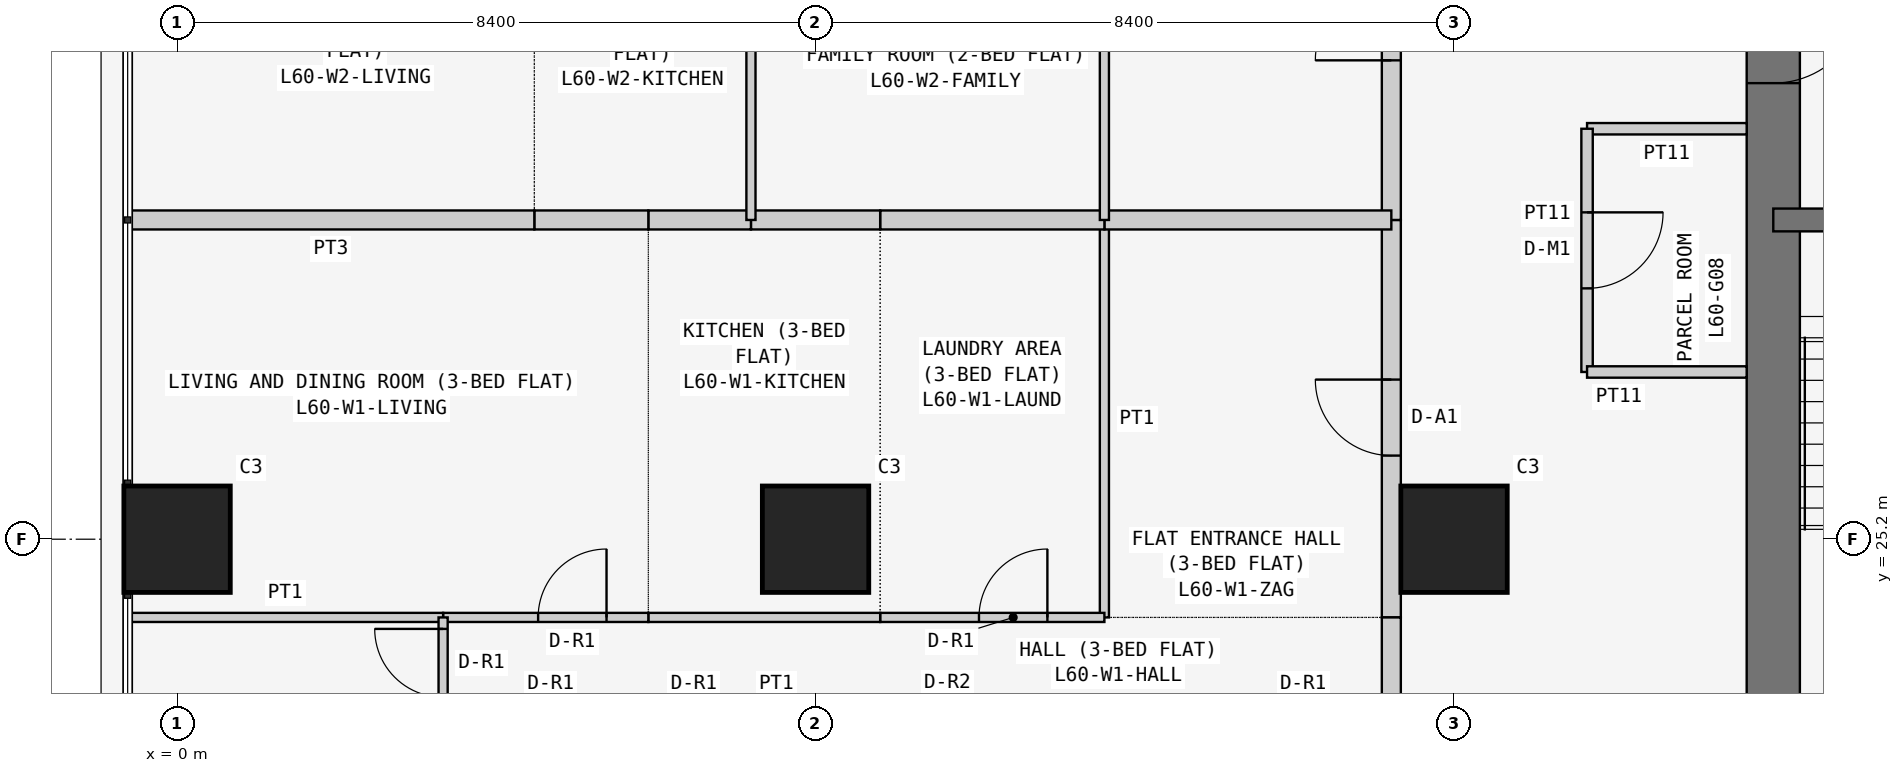
"""IFC4 building model, lengths in metres.
Left out: names, types, materials, properties, quantities, classifications, styles, units other than length and angle.
Written with IfcOpenShell. Run it as: python <this file> out.ifc"""

import sys

from ifc_helpers import new_model, si_unit, direction, frame, frame_2d, origin, origin_2d, place, context, subcontext, project, spatial, rectangle, extrude, element, fill, save


model = new_model("IFC4")
c1 = context("Model", 3, precision=1e-05, world=origin(), true_north=direction((0.0, 1.0)))
c2 = subcontext(c1, "Body", "Model", "MODEL_VIEW")
j1 = project(units=[si_unit("LENGTHUNIT", "METRE"), si_unit("PLANEANGLEUNIT", "RADIAN")], contexts=[c1])
p1 = place(None, origin())
s1 = spatial("IfcSite", under=j1, at=p1, CompositionType="ELEMENT")
p2 = place(p1, origin())
s2 = spatial("IfcBuilding", under=s1, at=p2, CompositionType="ELEMENT")
p3 = place(p2, frame((0.0, 0.0, 230.1)))
s3 = spatial("IfcBuildingStorey", under=s2, at=p3, CompositionType="ELEMENT", Elevation=230.1)
for number, where, z_axis, x_axis in (
    (1, (0.0, 25.2, 0.0), (0.0, 0.0, 1.0), (1.0, 0.0, 0.0)),
    (2, (8.4, 25.2, 0.0), (0.0, 0.0, 1.0), (1.0, 0.0, 0.0)),
    (3, (16.8, 25.2, 0.0), (0.0, 0.0, 1.0), (1.0, 0.0, 0.0)),
):
    element("IfcColumn", number, at=place(p3, frame(where, z_axis=z_axis, x_axis=x_axis)), inside=s3, PredefinedType="COLUMN", context=c2, shape_type="SweptSolid", body=[
        extrude(rectangle(XDim=1.4, YDim=1.4, at=origin_2d()), origin(), (0.0, 0.0, 1.0), 3.6),
    ])
p4 = place(p3, frame((21.0, 37.8, 0.0), z_axis=(0.0, 0.0, 1.0), x_axis=(0.0, -1.0, 0.0)))
e4 = element("IfcWall", 4, at=p4, inside=s3, PredefinedType="SHEAR", context=c2, shape_type="SweptSolid", body=[
    extrude(rectangle(XDim=17.15, YDim=0.7, at=frame_2d((8.575, 0.0))), origin(), (0.0, 0.0, 1.0), 3.6),
])
p5 = place(p4, frame((5.4, 0.0, 0.0)))
e5 = element("IfcOpeningElement", 5, at=p5, cuts=e4, PredefinedType="OPENING", context=c2, shape_type="SweptSolid", body=[
    extrude(rectangle(XDim=1.2, YDim=2.1, at=frame_2d((0.6, 1.05))), frame((0.0, 0.36, 0.0), z_axis=(0.0, -1.0, 0.0), x_axis=(1.0, 0.0, 0.0)), (0.0, 0.0, 1.0), 0.72),
])
p6 = place(p3, frame((21.0, 29.4, 0.0), z_axis=(0.0, 0.0, 1.0), x_axis=(1.0, 0.0, 0.0)))
e6 = element("IfcWall", 6, at=p6, inside=s3, PredefinedType="SHEAR", context=c2, shape_type="SweptSolid", body=[
    extrude(rectangle(XDim=5.6, YDim=0.3, at=frame_2d((2.8, 0.0))), origin(), (0.0, 0.0, 1.0), 3.6),
])
p7 = place(p6, frame((2.3, 0.0, 0.0)))
e7 = element("IfcOpeningElement", 7, at=p7, cuts=e6, PredefinedType="OPENING", context=c2, shape_type="SweptSolid", body=[
    extrude(rectangle(XDim=1.2, YDim=2.1, at=frame_2d((0.6, 1.05))), frame((0.0, 0.16, 0.0), z_axis=(0.0, -1.0, 0.0), x_axis=(1.0, 0.0, 0.0)), (0.0, 0.0, 1.0), 0.32),
])
p8 = place(p3, frame((20.65, 30.6, 0.0), z_axis=(0.0, 0.0, 1.0), x_axis=(-1.0, 0.0, 0.0)))
e8 = element("IfcWall", 8, at=p8, inside=s3, PredefinedType="PARTITIONING", context=c2, shape_type="SweptSolid", body=[
    extrude(rectangle(XDim=2.1, YDim=0.15, at=frame_2d((1.05, 0.0))), origin(), (0.0, 0.0, 1.0), 3.45),
])
p9 = place(p3, frame((18.55, 30.6, 0.0), z_axis=(0.0, 0.0, 1.0), x_axis=(0.0, -1.0, 0.0)))
e9 = element("IfcWall", 9, at=p9, inside=s3, PredefinedType="PARTITIONING", context=c2, shape_type="SweptSolid", body=[
    extrude(rectangle(XDim=3.2, YDim=0.15, at=frame_2d((1.6, 0.0))), origin(), (0.0, 0.0, 1.0), 3.45),
])
p10 = place(p9, frame((1.1, 0.0, 0.0)))
e10 = element("IfcOpeningElement", 10, at=p10, cuts=e9, PredefinedType="OPENING", context=c2, shape_type="SweptSolid", body=[
    extrude(rectangle(XDim=1.0, YDim=2.1, at=frame_2d((0.5, 1.05))), frame((0.0, 0.085, 0.0), z_axis=(0.0, -1.0, 0.0), x_axis=(1.0, 0.0, 0.0)), (0.0, 0.0, 1.0), 0.17),
])
p11 = place(p3, frame((18.55, 27.4, 0.0), z_axis=(0.0, 0.0, 1.0), x_axis=(1.0, 0.0, 0.0)))
e11 = element("IfcWall", 11, at=p11, inside=s3, PredefinedType="PARTITIONING", context=c2, shape_type="SweptSolid", body=[
    extrude(rectangle(XDim=2.1, YDim=0.15, at=frame_2d((1.05, 0.0))), origin(), (0.0, 0.0, 1.0), 3.45),
])
p12 = place(p3, frame((15.975, 24.171, 0.0), z_axis=(0.0, 0.0, 1.0), x_axis=(0.0, 1.0, 0.0)))
e12 = element("IfcWall", 12, at=p12, inside=s3, PredefinedType="PARTITIONING", context=c2, shape_type="SweptSolid", body=[
    extrude(rectangle(XDim=5.229, YDim=0.25, at=frame_2d((2.615, 0.0))), origin(), (0.0, 0.0, 1.0), 3.45),
])
p13 = place(p12, frame((2.129, 0.0, 0.0)))
e13 = element("IfcOpeningElement", 13, at=p13, cuts=e12, PredefinedType="OPENING", context=c2, shape_type="SweptSolid", body=[
    extrude(rectangle(XDim=1.0, YDim=2.1, at=frame_2d((0.5, 1.05))), frame((0.0, 0.135, 0.0), z_axis=(0.0, -1.0, 0.0), x_axis=(1.0, 0.0, 0.0)), (0.0, 0.0, 1.0), 0.27),
])
p14 = place(p3, frame((15.975, 22.971, 0.0), z_axis=(0.0, 0.0, 1.0), x_axis=(0.0, 1.0, 0.0)))
e14 = element("IfcWall", 14, at=p14, inside=s3, PredefinedType="PARTITIONING", context=c2, shape_type="SweptSolid", body=[
    extrude(rectangle(XDim=1.2, YDim=0.25, at=frame_2d((0.6, 0.0))), origin(), (0.0, 0.0, 1.0), 3.45),
])
p15 = place(p3, frame((15.975, 29.4, 0.0), z_axis=(0.0, 0.0, 1.0), x_axis=(0.0, 1.0, 0.0)))
e15 = element("IfcWall", 15, at=p15, inside=s3, PredefinedType="PARTITIONING", context=c2, shape_type="SweptSolid", body=[
    extrude(rectangle(XDim=5.229, YDim=0.25, at=frame_2d((2.615, 0.0))), origin(), (0.0, 0.0, 1.0), 3.45),
])
p16 = place(p15, frame((2.1, 0.0, 0.0)))
e16 = element("IfcOpeningElement", 16, at=p16, cuts=e15, PredefinedType="OPENING", context=c2, shape_type="SweptSolid", body=[
    extrude(rectangle(XDim=1.0, YDim=2.1, at=frame_2d((0.5, 1.05))), frame((0.0, 0.135, 0.0), z_axis=(0.0, -1.0, 0.0), x_axis=(1.0, 0.0, 0.0)), (0.0, 0.0, 1.0), 0.27),
])
p17 = place(p3, frame((12.2, 29.4, 0.0), z_axis=(0.0, 0.0, 1.0), x_axis=(0.0, -1.0, 0.0)))
e17 = element("IfcWall", 17, at=p17, inside=s3, PredefinedType="PARTITIONING", context=c2, shape_type="SweptSolid", body=[
    extrude(rectangle(XDim=5.229, YDim=0.12, at=frame_2d((2.615, 0.0))), origin(), (0.0, 0.0, 1.0), 3.45),
])
p18 = place(p3, frame((15.975, 29.4, 0.0), z_axis=(0.0, 0.0, 1.0), x_axis=(-1.0, 0.0, 0.0)))
e18 = element("IfcWall", 18, at=p18, inside=s3, PredefinedType="PARTITIONING", context=c2, shape_type="SweptSolid", body=[
    extrude(rectangle(XDim=3.775, YDim=0.25, at=frame_2d((1.888, 0.0))), origin(), (0.0, 0.0, 1.0), 3.45),
])
p19 = place(p3, frame((9.25, 24.171, 0.0), z_axis=(0.0, 0.0, 1.0), x_axis=(1.0, 0.0, 0.0)))
e19 = element("IfcWall", 19, at=p19, inside=s3, PredefinedType="PARTITIONING", context=c2, shape_type="SweptSolid", body=[
    extrude(rectangle(XDim=2.95, YDim=0.12, at=frame_2d((1.475, 0.0))), origin(), (0.0, 0.0, 1.0), 3.45),
])
p20 = place(p19, frame((1.3, 0.0, 0.0)))
e20 = element("IfcOpeningElement", 20, at=p20, cuts=e19, PredefinedType="OPENING", context=c2, shape_type="SweptSolid", body=[
    extrude(rectangle(XDim=0.9, YDim=2.1, at=frame_2d((0.45, 1.05))), frame((0.0, 0.07, 0.0), z_axis=(0.0, -1.0, 0.0), x_axis=(1.0, 0.0, 0.0)), (0.0, 0.0, 1.0), 0.14),
])
p21 = place(p3, frame((12.2, 29.4, 0.0), z_axis=(0.0, 0.0, 1.0), x_axis=(-1.0, 0.0, 0.0)))
e21 = element("IfcWall", 21, at=p21, inside=s3, PredefinedType="PARTITIONING", context=c2, shape_type="SweptSolid", body=[
    extrude(rectangle(XDim=2.95, YDim=0.25, at=frame_2d((1.475, 0.0))), origin(), (0.0, 0.0, 1.0), 3.45),
])
p22 = place(p3, frame((6.2, 24.171, 0.0), z_axis=(0.0, 0.0, 1.0), x_axis=(1.0, 0.0, 0.0)))
e22 = element("IfcWall", 22, at=p22, inside=s3, PredefinedType="PARTITIONING", context=c2, shape_type="SweptSolid", body=[
    extrude(rectangle(XDim=3.05, YDim=0.12, at=frame_2d((1.525, 0.0))), origin(), (0.0, 0.0, 1.0), 3.45),
])
p23 = place(p3, frame((9.25, 29.4, 0.0), z_axis=(0.0, 0.0, 1.0), x_axis=(-1.0, 0.0, 0.0)))
e23 = element("IfcWall", 23, at=p23, inside=s3, PredefinedType="PARTITIONING", context=c2, shape_type="SweptSolid", body=[
    extrude(rectangle(XDim=1.7, YDim=0.25, at=frame_2d((0.85, 0.0))), origin(), (0.0, 0.0, 1.0), 3.45),
])
p24 = place(p3, frame((7.55, 29.4, 0.0), z_axis=(0.0, 0.0, 1.0), x_axis=(-1.0, 0.0, 0.0)))
e24 = element("IfcWall", 24, at=p24, inside=s3, PredefinedType="PARTITIONING", context=c2, shape_type="SweptSolid", body=[
    extrude(rectangle(XDim=1.35, YDim=0.25, at=frame_2d((0.675, 0.0))), origin(), (0.0, 0.0, 1.0), 3.45),
])
p25 = place(p3, frame((3.5, 24.171, 0.0), z_axis=(0.0, 0.0, 1.0), x_axis=(1.0, 0.0, 0.0)))
e25 = element("IfcWall", 25, at=p25, inside=s3, PredefinedType="PARTITIONING", context=c2, shape_type="SweptSolid", body=[
    extrude(rectangle(XDim=2.7, YDim=0.12, at=frame_2d((1.35, 0.0))), origin(), (0.0, 0.0, 1.0), 3.45),
])
p26 = place(p25, frame((1.25, 0.0, 0.0)))
e26 = element("IfcOpeningElement", 26, at=p26, cuts=e25, PredefinedType="OPENING", context=c2, shape_type="SweptSolid", body=[
    extrude(rectangle(XDim=0.9, YDim=2.1, at=frame_2d((0.45, 1.05))), frame((0.0, 0.07, 0.0), z_axis=(0.0, -1.0, 0.0), x_axis=(1.0, 0.0, 0.0)), (0.0, 0.0, 1.0), 0.14),
])
p27 = place(p3, frame((-0.65, 24.171, 0.0), z_axis=(0.0, 0.0, 1.0), x_axis=(1.0, 0.0, 0.0)))
e27 = element("IfcWall", 27, at=p27, inside=s3, PredefinedType="PARTITIONING", context=c2, shape_type="SweptSolid", body=[
    extrude(rectangle(XDim=4.15, YDim=0.12, at=frame_2d((2.075, 0.0))), origin(), (0.0, 0.0, 1.0), 3.45),
])
p28 = place(p3, frame((6.2, 29.4, 0.0), z_axis=(0.0, 0.0, 1.0), x_axis=(-1.0, 0.0, 0.0)))
e28 = element("IfcWall", 28, at=p28, inside=s3, PredefinedType="PARTITIONING", context=c2, shape_type="SweptSolid", body=[
    extrude(rectangle(XDim=1.5, YDim=0.25, at=frame_2d((0.75, 0.0))), origin(), (0.0, 0.0, 1.0), 3.45),
])
p29 = place(p3, frame((4.7, 29.4, 0.0), z_axis=(0.0, 0.0, 1.0), x_axis=(-1.0, 0.0, 0.0)))
e29 = element("IfcWall", 29, at=p29, inside=s3, PredefinedType="PARTITIONING", context=c2, shape_type="SweptSolid", body=[
    extrude(rectangle(XDim=5.35, YDim=0.25, at=frame_2d((2.675, 0.0))), origin(), (0.0, 0.0, 1.0), 3.45),
])
p30 = place(p3, frame((3.5, 24.171, 0.0), z_axis=(0.0, 0.0, 1.0), x_axis=(0.0, -1.0, 0.0)))
e30 = element("IfcWall", 30, at=p30, inside=s3, PredefinedType="PARTITIONING", context=c2, shape_type="SweptSolid", body=[
    extrude(rectangle(XDim=1.2, YDim=0.12, at=frame_2d((0.6, 0.0))), origin(), (0.0, 0.0, 1.0), 3.45),
])
p31 = place(p30, frame((0.151, 0.0, 0.0)))
e31 = element("IfcOpeningElement", 31, at=p31, cuts=e30, PredefinedType="OPENING", context=c2, shape_type="SweptSolid", body=[
    extrude(rectangle(XDim=0.9, YDim=2.1, at=frame_2d((0.45, 1.05))), frame((0.0, 0.07, 0.0), z_axis=(0.0, -1.0, 0.0), x_axis=(1.0, 0.0, 0.0)), (0.0, 0.0, 1.0), 0.14),
])
for number, where, z_axis, x_axis in (
    (32, (12.2, 29.4, 0.0), (0.0, 0.0, 1.0), (0.0, 1.0, 0.0)),
    (33, (7.55, 29.4, 0.0), (0.0, 0.0, 1.0), (0.0, 1.0, 0.0)),
):
    element("IfcWall", number, at=place(p3, frame(where, z_axis=z_axis, x_axis=x_axis)), inside=s3, PredefinedType="PARTITIONING", context=c2, shape_type="SweptSolid", body=[
        extrude(rectangle(XDim=5.229, YDim=0.12, at=frame_2d((2.615, 0.0))), origin(), (0.0, 0.0, 1.0), 3.45),
    ])
p32 = place(p10, origin())
e34 = element("IfcDoor", 34, at=p32, inside=s3, OperationType="SINGLE_SWING_LEFT", PredefinedType="DOOR", context=c2, shape_type="SweptSolid", body=[
    extrude(rectangle(XDim=1.0, YDim=2.1, at=frame_2d((0.5, 1.05))), frame((0.0, 0.025, 0.0), z_axis=(0.0, -1.0, 0.0), x_axis=(1.0, 0.0, 0.0)), (0.0, 0.0, 1.0), 0.05),
])
fill(e10, e34)
p33 = place(p13, origin())
e35 = element("IfcDoor", 35, at=p33, inside=s3, OperationType="SINGLE_SWING_RIGHT", PredefinedType="DOOR", context=c2, shape_type="SweptSolid", body=[
    extrude(rectangle(XDim=1.0, YDim=2.1, at=frame_2d((0.5, 1.05))), frame((0.0, 0.025, 0.0), z_axis=(0.0, -1.0, 0.0), x_axis=(1.0, 0.0, 0.0)), (0.0, 0.0, 1.0), 0.05),
])
fill(e13, e35)
p34 = place(p20, origin())
e36 = element("IfcDoor", 36, at=p34, inside=s3, OperationType="SINGLE_SWING_RIGHT", PredefinedType="DOOR", context=c2, shape_type="SweptSolid", body=[
    extrude(rectangle(XDim=0.9, YDim=2.1, at=frame_2d((0.45, 1.05))), frame((0.0, 0.025, 0.0), z_axis=(0.0, -1.0, 0.0), x_axis=(1.0, 0.0, 0.0)), (0.0, 0.0, 1.0), 0.05),
])
fill(e20, e36)
p35 = place(p26, origin())
e37 = element("IfcDoor", 37, at=p35, inside=s3, OperationType="SINGLE_SWING_RIGHT", PredefinedType="DOOR", context=c2, shape_type="SweptSolid", body=[
    extrude(rectangle(XDim=0.9, YDim=2.1, at=frame_2d((0.45, 1.05))), frame((0.0, 0.025, 0.0), z_axis=(0.0, -1.0, 0.0), x_axis=(1.0, 0.0, 0.0)), (0.0, 0.0, 1.0), 0.05),
])
fill(e26, e37)
p36 = place(p31, frame((0.9, 0.0, 0.0), z_axis=(0.0, 0.0, 1.0), x_axis=(-1.0, 0.0, 0.0)))
e38 = element("IfcDoor", 38, at=p36, inside=s3, OperationType="SINGLE_SWING_RIGHT", PredefinedType="DOOR", context=c2, shape_type="SweptSolid", body=[
    extrude(rectangle(XDim=0.9, YDim=2.1, at=frame_2d((0.45, 1.05))), frame((0.0, 0.025, 0.0), z_axis=(0.0, -1.0, 0.0), x_axis=(1.0, 0.0, 0.0)), (0.0, 0.0, 1.0), 0.05),
])
fill(e31, e38)
p37 = place(p16, origin())
e39 = element("IfcDoor", 39, at=p37, inside=s3, OperationType="SINGLE_SWING_LEFT", PredefinedType="DOOR", context=c2, shape_type="SweptSolid", body=[
    extrude(rectangle(XDim=1.0, YDim=2.1, at=frame_2d((0.5, 1.05))), frame((0.0, 0.025, 0.0), z_axis=(0.0, -1.0, 0.0), x_axis=(1.0, 0.0, 0.0)), (0.0, 0.0, 1.0), 0.05),
])
fill(e16, e39)
p38 = place(p5, origin())
e40 = element("IfcDoor", 40, at=p38, inside=s3, OperationType="SINGLE_SWING_LEFT", PredefinedType="DOOR", context=c2, shape_type="SweptSolid", body=[
    extrude(rectangle(XDim=1.2, YDim=2.1, at=frame_2d((0.6, 1.05))), frame((0.0, 0.025, 0.0), z_axis=(0.0, -1.0, 0.0), x_axis=(1.0, 0.0, 0.0)), (0.0, 0.0, 1.0), 0.05),
])
fill(e5, e40)
save(model, sys.argv[1])
